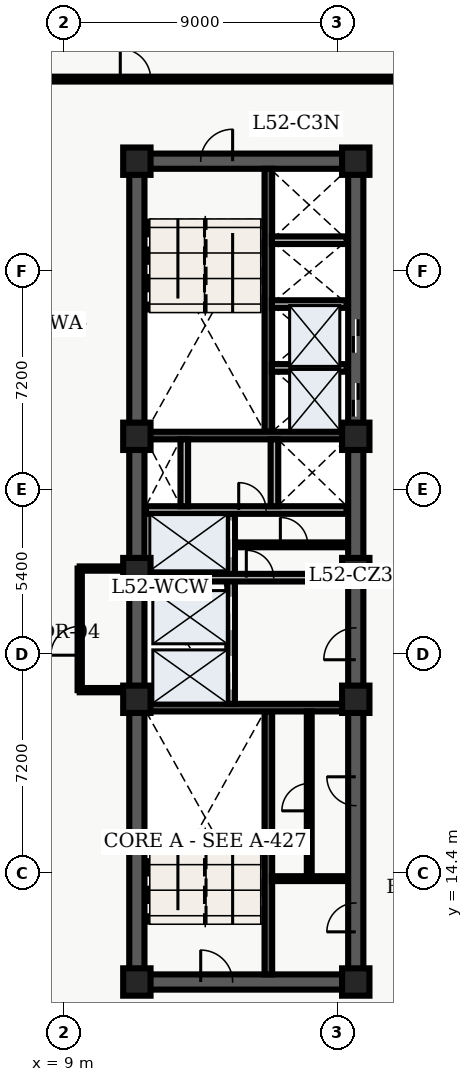
"""IFC4 building model, lengths in metres.
Left out: names, types, materials, properties, quantities, classifications, styles, units other than length and angle.
Written with IfcOpenShell. Run it as: python <this file> out.ifc"""

import sys

from ifc_helpers import new_model, entity, si_unit, converted_unit, direction, frame, origin_with_axes, origin_2d_with_axis, place, context, subcontext, project, spatial, polyline, rectangle, outline, extrude, element, fill, save


model = new_model("IFC4")
c1 = context("Model", 3, precision=1e-05, world=origin_with_axes(), true_north=direction((0.0, 1.0)))
c2 = subcontext(c1, "Body", "Model", "MODEL_VIEW")
j1 = project(units=[si_unit("LENGTHUNIT", "METRE"), converted_unit("PLANEANGLEUNIT", "DEGREE", entity("IfcPlaneAngleMeasure", 0.017), si_unit("PLANEANGLEUNIT", "RADIAN"), dimensions=[0, 0, 0, 0, 0, 0, 0])], contexts=[c1])
p1 = place(None, origin_with_axes())
s1 = spatial("IfcSite", under=j1, at=p1, CompositionType="ELEMENT")
p2 = place(p1, origin_with_axes())
s2 = spatial("IfcBuilding", under=s1, at=p2, CompositionType="ELEMENT")
p3 = place(p2, frame((0.0, 0.0, 212.1), z_axis=(0.0, 0.0, 1.0), x_axis=(1.0, 0.0, 0.0)))
s3 = spatial("IfcBuildingStorey", under=s2, at=p3, CompositionType="ELEMENT", Elevation=212.1)
p4 = place(p3, frame((11.4, 10.8, 0.0), z_axis=(0.0, 0.0, 1.0), x_axis=(0.0, 1.0, 0.0)))
e1 = element("IfcWall", 1, at=p4, inside=s3, PredefinedType="SHEAR", context=c2, shape_type="SweptSolid", body=[
    extrude(outline(polyline([(0.0, -0.25), (27.0, -0.25), (27.0, 0.25), (0.0, 0.25), (0.0, -0.25)])), origin_with_axes(), (0.0, 0.0, 1.0), 3.66),
])
p5 = place(p3, frame((11.4, 10.8, 0.0), z_axis=(0.0, 0.0, 1.0), x_axis=(1.0, 0.0, 0.0)))
e2 = element("IfcWall", 2, at=p5, inside=s3, PredefinedType="SHEAR", context=c2, shape_type="SweptSolid", body=[
    extrude(outline(polyline([(0.0, -0.25), (7.2, -0.25), (7.2, 0.25), (0.0, 0.25), (0.0, -0.25)])), origin_with_axes(), (0.0, 0.0, 1.0), 3.66),
])
p6 = place(p5, frame((2.625, 0.0, 0.0), z_axis=(0.0, 0.0, 1.0), x_axis=(1.0, 0.0, 0.0)))
e3 = element("IfcOpeningElement", 3, at=p6, cuts=e2, PredefinedType="OPENING", context=c2, shape_type="SweptSolid", body=[
    extrude(rectangle(XDim=1.05, YDim=0.52, at=origin_2d_with_axis()), origin_with_axes(), (0.0, 0.0, 1.0), 2.15),
])
p7 = place(p3, frame((11.4, 37.8, 0.0), z_axis=(0.0, 0.0, 1.0), x_axis=(1.0, 0.0, 0.0)))
e4 = element("IfcWall", 4, at=p7, inside=s3, PredefinedType="SHEAR", context=c2, shape_type="SweptSolid", body=[
    extrude(outline(polyline([(0.0, -0.25), (7.2, -0.25), (7.2, 0.25), (0.0, 0.25), (0.0, -0.25)])), origin_with_axes(), (0.0, 0.0, 1.0), 3.66),
])
p8 = place(p7, frame((2.625, 0.0, 0.0), z_axis=(0.0, 0.0, 1.0), x_axis=(1.0, 0.0, 0.0)))
e5 = element("IfcOpeningElement", 5, at=p8, cuts=e4, PredefinedType="OPENING", context=c2, shape_type="SweptSolid", body=[
    extrude(rectangle(XDim=1.05, YDim=0.52, at=origin_2d_with_axis()), origin_with_axes(), (0.0, 0.0, 1.0), 2.15),
])
p9 = place(p3, frame((18.6, 10.8, 0.0), z_axis=(0.0, 0.0, 1.0), x_axis=(0.0, 1.0, 0.0)))
e6 = element("IfcWall", 6, at=p9, inside=s3, PredefinedType="SHEAR", context=c2, shape_type="SweptSolid", body=[
    extrude(outline(polyline([(0.0, -0.25), (13.5, -0.25), (13.5, 0.25), (0.0, 0.25), (0.0, -0.25)])), origin_with_axes(), (0.0, 0.0, 1.0), 3.66),
])
p10 = place(p9, frame((11.125, 0.0, 0.0), z_axis=(0.0, 0.0, 1.0), x_axis=(1.0, 0.0, 0.0)))
e7 = element("IfcOpeningElement", 7, at=p10, cuts=e6, PredefinedType="OPENING", context=c2, shape_type="SweptSolid", body=[
    extrude(rectangle(XDim=1.05, YDim=0.52, at=origin_2d_with_axis()), origin_with_axes(), (0.0, 0.0, 1.0), 2.15),
])
p11 = place(p9, frame((2.125, 0.0, 0.0), z_axis=(0.0, 0.0, 1.0), x_axis=(1.0, 0.0, 0.0)))
e8 = element("IfcOpeningElement", 8, at=p11, cuts=e6, PredefinedType="OPENING", context=c2, shape_type="SweptSolid", body=[
    extrude(rectangle(XDim=0.95, YDim=0.52, at=origin_2d_with_axis()), origin_with_axes(), (0.0, 0.0, 1.0), 2.15),
])
p12 = place(p9, frame((6.275, 0.0, 0.0), z_axis=(0.0, 0.0, 1.0), x_axis=(1.0, 0.0, 0.0)))
e9 = element("IfcOpeningElement", 9, at=p12, cuts=e6, PredefinedType="OPENING", context=c2, shape_type="SweptSolid", body=[
    extrude(rectangle(XDim=0.95, YDim=0.52, at=origin_2d_with_axis()), origin_with_axes(), (0.0, 0.0, 1.0), 2.15),
])
p13 = place(p3, frame((18.6, 24.3, 0.0), z_axis=(0.0, 0.0, 1.0), x_axis=(0.0, 1.0, 0.0)))
e10 = element("IfcWall", 10, at=p13, inside=s3, PredefinedType="SHEAR", context=c2, shape_type="SweptSolid", body=[
    extrude(outline(polyline([(0.0, -0.25), (13.5, -0.25), (13.5, 0.25), (0.0, 0.25), (0.0, -0.25)])), origin_with_axes(), (0.0, 0.0, 1.0), 3.66),
])
p14 = place(p13, frame((5.65, 0.0, 0.0), z_axis=(0.0, 0.0, 1.0), x_axis=(1.0, 0.0, 0.0)))
e11 = element("IfcOpeningElement", 11, at=p14, cuts=e10, PredefinedType="OPENING", context=c2, shape_type="SweptSolid", body=[
    extrude(rectangle(XDim=1.1, YDim=0.52, at=origin_2d_with_axis()), origin_with_axes(), (0.0, 0.0, 1.0), 2.15),
])
p15 = place(p13, frame((7.75, 0.0, 0.0), z_axis=(0.0, 0.0, 1.0), x_axis=(1.0, 0.0, 0.0)))
e12 = element("IfcOpeningElement", 12, at=p15, cuts=e10, PredefinedType="OPENING", context=c2, shape_type="SweptSolid", body=[
    extrude(rectangle(XDim=1.1, YDim=0.52, at=origin_2d_with_axis()), origin_with_axes(), (0.0, 0.0, 1.0), 2.15),
])
p16 = place(p3, frame((15.725, 11.05, 0.0), z_axis=(0.0, 0.0, 1.0), x_axis=(0.0, 1.0, 0.0)))
e13 = element("IfcWall", 13, at=p16, inside=s3, PredefinedType="SHEAR", context=c2, shape_type="SweptSolid", body=[
    extrude(outline(polyline([(0.0, -0.125), (8.65, -0.125), (8.65, 0.125), (0.0, 0.125), (0.0, -0.125)])), origin_with_axes(), (0.0, 0.0, 1.0), 3.66),
])
p17 = place(p3, frame((11.65, 19.825, 0.0), z_axis=(0.0, 0.0, 1.0), x_axis=(1.0, 0.0, 0.0)))
e14 = element("IfcWall", 14, at=p17, inside=s3, PredefinedType="SHEAR", context=c2, shape_type="SweptSolid", body=[
    extrude(outline(polyline([(0.0, -0.125), (6.7, -0.125), (6.7, 0.125), (0.0, 0.125), (0.0, -0.125)])), origin_with_axes(), (0.0, 0.0, 1.0), 3.66),
])
p18 = place(p3, frame((15.725, 28.9, 0.0), z_axis=(0.0, 0.0, 1.0), x_axis=(0.0, 1.0, 0.0)))
e15 = element("IfcWall", 15, at=p18, inside=s3, PredefinedType="SHEAR", context=c2, shape_type="SweptSolid", body=[
    extrude(outline(polyline([(0.0, -0.125), (8.65, -0.125), (8.65, 0.125), (0.0, 0.125), (0.0, -0.125)])), origin_with_axes(), (0.0, 0.0, 1.0), 3.66),
])
p19 = place(p3, frame((11.65, 28.775, 0.0), z_axis=(0.0, 0.0, 1.0), x_axis=(1.0, 0.0, 0.0)))
e16 = element("IfcWall", 16, at=p19, inside=s3, PredefinedType="SHEAR", context=c2, shape_type="SweptSolid", body=[
    extrude(outline(polyline([(0.0, -0.125), (6.7, -0.125), (6.7, 0.125), (0.0, 0.125), (0.0, -0.125)])), origin_with_axes(), (0.0, 0.0, 1.0), 3.66),
])
p20 = place(p3, frame((14.5, 19.95, 0.0), z_axis=(0.0, 0.0, 1.0), x_axis=(0.0, 1.0, 0.0)))
e17 = element("IfcWall", 17, at=p20, inside=s3, PredefinedType="SOLIDWALL", context=c2, shape_type="SweptSolid", body=[
    extrude(outline(polyline([(0.0, -0.125), (6.25, -0.125), (6.25, 0.125), (0.0, 0.125), (0.0, -0.125)])), origin_with_axes(), (0.0, 0.0, 1.0), 2.7),
])
p21 = place(p20, frame((1.025, 0.0, 0.0), z_axis=(0.0, 0.0, 1.0), x_axis=(1.0, 0.0, 0.0)))
e18 = element("IfcOpeningElement", 18, at=p21, cuts=e17, PredefinedType="OPENING", context=c2, shape_type="SweptSolid", body=[
    extrude(rectangle(XDim=1.1, YDim=0.27, at=origin_2d_with_axis()), origin_with_axes(), (0.0, 0.0, 1.0), 2.15),
])
p22 = place(p20, frame((2.975, 0.0, 0.0), z_axis=(0.0, 0.0, 1.0), x_axis=(1.0, 0.0, 0.0)))
e19 = element("IfcOpeningElement", 19, at=p22, cuts=e17, PredefinedType="OPENING", context=c2, shape_type="SweptSolid", body=[
    extrude(rectangle(XDim=1.1, YDim=0.27, at=origin_2d_with_axis()), origin_with_axes(), (0.0, 0.0, 1.0), 2.15),
])
p23 = place(p20, frame((5.425, 0.0, 0.0), z_axis=(0.0, 0.0, 1.0), x_axis=(1.0, 0.0, 0.0)))
e20 = element("IfcOpeningElement", 20, at=p23, cuts=e17, PredefinedType="OPENING", context=c2, shape_type="SweptSolid", body=[
    extrude(rectangle(XDim=1.2, YDim=0.27, at=origin_2d_with_axis()), origin_with_axes(), (0.0, 0.0, 1.0), 2.15),
])
p24 = place(p3, frame((11.7, 24.1, 0.0), z_axis=(0.0, 0.0, 1.0), x_axis=(1.0, 0.0, 0.0)))
e21 = element("IfcWall", 21, at=p24, inside=s3, PredefinedType="SOLIDWALL", context=c2, shape_type="SweptSolid", body=[
    extrude(outline(polyline([(0.0, -0.125), (6.6, -0.125), (6.6, 0.125), (0.0, 0.125), (0.0, -0.125)])), origin_with_axes(), (0.0, 0.0, 1.0), 2.7),
])
p25 = place(p24, frame((3.75, 0.0, 0.0), z_axis=(0.0, 0.0, 1.0), x_axis=(1.0, 0.0, 0.0)))
e22 = element("IfcOpeningElement", 22, at=p25, cuts=e21, PredefinedType="OPENING", context=c2, shape_type="SweptSolid", body=[
    extrude(rectangle(XDim=0.9, YDim=0.27, at=origin_2d_with_axis()), origin_with_axes(), (0.0, 0.0, 1.0), 2.15),
])
p26 = place(p3, frame((11.7, 26.325, 0.0), z_axis=(0.0, 0.0, 1.0), x_axis=(1.0, 0.0, 0.0)))
e23 = element("IfcWall", 23, at=p26, inside=s3, PredefinedType="SOLIDWALL", context=c2, shape_type="SweptSolid", body=[
    extrude(outline(polyline([(0.0, -0.125), (6.6, -0.125), (6.6, 0.125), (0.0, 0.125), (0.0, -0.125)])), origin_with_axes(), (0.0, 0.0, 1.0), 2.7),
])
p27 = place(p26, frame((3.5, 0.0, 0.0), z_axis=(0.0, 0.0, 1.0), x_axis=(1.0, 0.0, 0.0)))
e24 = element("IfcOpeningElement", 24, at=p27, cuts=e23, PredefinedType="OPENING", context=c2, shape_type="SweptSolid", body=[
    extrude(rectangle(XDim=0.9, YDim=0.27, at=origin_2d_with_axis()), origin_with_axes(), (0.0, 0.0, 1.0), 2.15),
])
for number, where, z_axis, x_axis in (
    (25, (12.96, 26.45, 0.0), (0.0, 0.0, 1.0), (0.0, 1.0, 0.0)),
    (26, (15.925, 26.45, 0.0), (0.0, 0.0, 1.0), (0.0, 1.0, 0.0)),
):
    element("IfcWall", number, at=place(p3, frame(where, z_axis=z_axis, x_axis=x_axis)), inside=s3, PredefinedType="SOLIDWALL", context=c2, shape_type="SweptSolid", body=[
        extrude(outline(polyline([(0.0, -0.125), (2.2, -0.125), (2.2, 0.125), (0.0, 0.125), (0.0, -0.125)])), origin_with_axes(), (0.0, 0.0, 1.0), 2.7),
    ])
for number, where, z_axis, x_axis in (
    (27, (11.4, 10.8, 0.0), (0.0, 0.0, 1.0), (1.0, 0.0, 0.0)),
    (28, (11.4, 20.1, 0.0), (0.0, 0.0, 1.0), (1.0, 0.0, 0.0)),
    (29, (11.4, 24.3, 0.0), (0.0, 0.0, 1.0), (1.0, 0.0, 0.0)),
    (30, (11.4, 28.75, 0.0), (0.0, 0.0, 1.0), (1.0, 0.0, 0.0)),
    (31, (11.4, 37.8, 0.0), (0.0, 0.0, 1.0), (1.0, 0.0, 0.0)),
    (32, (18.6, 10.8, 0.0), (0.0, 0.0, 1.0), (1.0, 0.0, 0.0)),
    (33, (18.6, 20.1, 0.0), (0.0, 0.0, 1.0), (1.0, 0.0, 0.0)),
    (34, (18.6, 24.3, 0.0), (0.0, 0.0, 1.0), (1.0, 0.0, 0.0)),
    (35, (18.6, 28.75, 0.0), (0.0, 0.0, 1.0), (1.0, 0.0, 0.0)),
    (36, (18.6, 37.8, 0.0), (0.0, 0.0, 1.0), (1.0, 0.0, 0.0)),
):
    element("IfcColumn", number, at=place(p3, frame(where, z_axis=z_axis, x_axis=x_axis)), inside=s3, PredefinedType="COLUMN", context=c2, shape_type="SweptSolid", body=[
        extrude(rectangle(XDim=0.9, YDim=0.9, at=origin_2d_with_axis()), origin_with_axes(), (0.0, 0.0, 1.0), 3.9),
    ])
p28 = place(p3, frame((14.62, 25.18, 0.0), z_axis=(0.0, 0.0, 1.0), x_axis=(1.0, 0.0, 0.0)))
e37 = element("IfcWall", 37, at=p28, inside=s3, PredefinedType="PARTITIONING", context=c2, shape_type="SweptSolid", body=[
    extrude(outline(polyline([(0.0, -0.08), (3.68, -0.08), (3.68, 0.08), (0.0, 0.08), (0.0, -0.08)])), origin_with_axes(), (0.0, 0.0, 1.0), 2.7),
])
p29 = place(p28, frame((1.95, 0.0, 0.0), z_axis=(0.0, 0.0, 1.0), x_axis=(1.0, 0.0, 0.0)))
e38 = element("IfcOpeningElement", 38, at=p29, cuts=e37, PredefinedType="OPENING", context=c2, shape_type="SweptSolid", body=[
    extrude(rectangle(XDim=0.9, YDim=0.18, at=origin_2d_with_axis()), origin_with_axes(), (0.0, 0.0, 1.0), 2.15),
])
p30 = place(p3, frame((15.84, 14.2, 0.0), z_axis=(0.0, 0.0, 1.0), x_axis=(1.0, 0.0, 0.0)))
e39 = element("IfcWall", 39, at=p30, inside=s3, PredefinedType="PARTITIONING", context=c2, shape_type="SweptSolid", body=[
    extrude(outline(polyline([(0.0, -0.08), (2.46, -0.08), (2.46, 0.08), (0.0, 0.08), (0.0, -0.08)])), origin_with_axes(), (0.0, 0.0, 1.0), 2.7),
])
p31 = place(p3, frame((17.07, 14.28, 0.0), z_axis=(0.0, 0.0, 1.0), x_axis=(0.0, 1.0, 0.0)))
e40 = element("IfcWall", 40, at=p31, inside=s3, PredefinedType="PARTITIONING", context=c2, shape_type="SweptSolid", body=[
    extrude(outline(polyline([(0.0, -0.08), (5.42, -0.08), (5.42, 0.08), (0.0, 0.08), (0.0, -0.08)])), origin_with_axes(), (0.0, 0.0, 1.0), 2.7),
])
p32 = place(p31, frame((2.6, 0.0, 0.0), z_axis=(0.0, 0.0, 1.0), x_axis=(1.0, 0.0, 0.0)))
e41 = element("IfcOpeningElement", 41, at=p32, cuts=e40, PredefinedType="OPENING", context=c2, shape_type="SweptSolid", body=[
    extrude(rectangle(XDim=0.9, YDim=0.18, at=origin_2d_with_axis()), origin_with_axes(), (0.0, 0.0, 1.0), 2.15),
])
for number, where, z_axis, x_axis in (
    (42, (15.84, 31.0, 0.0), (0.0, 0.0, 1.0), (1.0, 0.0, 0.0)),
    (43, (15.84, 33.1, 0.0), (0.0, 0.0, 1.0), (1.0, 0.0, 0.0)),
    (44, (15.84, 35.2, 0.0), (0.0, 0.0, 1.0), (1.0, 0.0, 0.0)),
):
    element("IfcWall", number, at=place(p3, frame(where, z_axis=z_axis, x_axis=x_axis)), inside=s3, PredefinedType="SOLIDWALL", context=c2, shape_type="SweptSolid", body=[
        extrude(outline(polyline([(0.0, -0.125), (2.46, -0.125), (2.46, 0.125), (0.0, 0.125), (0.0, -0.125)])), origin_with_axes(), (0.0, 0.0, 1.0), 2.7),
    ])
p33 = place(p3, frame((9.52, 20.4, 0.0), z_axis=(0.0, 0.0, 1.0), x_axis=(0.0, 1.0, 0.0)))
e45 = element("IfcWall", 45, at=p33, inside=s3, PredefinedType="PARTITIONING", context=c2, shape_type="SweptSolid", body=[
    extrude(outline(polyline([(0.0, -0.07), (4.0, -0.07), (4.0, 0.07), (0.0, 0.07), (0.0, -0.07)])), origin_with_axes(), (0.0, 0.0, 1.0), 2.7),
])
p34 = place(p33, frame((1.625, 0.0, 0.0), z_axis=(0.0, 0.0, 1.0), x_axis=(1.0, 0.0, 0.0)))
e46 = element("IfcOpeningElement", 46, at=p34, cuts=e45, PredefinedType="OPENING", context=c2, shape_type="SweptSolid", body=[
    extrude(rectangle(XDim=0.95, YDim=0.16, at=origin_2d_with_axis()), origin_with_axes(), (0.0, 0.0, 1.0), 2.15),
])
for number, where, z_axis, x_axis in (
    (47, (9.52, 20.4, 0.0), (0.0, 0.0, 1.0), (1.0, 0.0, 0.0)),
    (48, (9.52, 24.4, 0.0), (0.0, 0.0, 1.0), (1.0, 0.0, 0.0)),
):
    element("IfcWall", number, at=place(p3, frame(where, z_axis=z_axis, x_axis=x_axis)), inside=s3, PredefinedType="PARTITIONING", context=c2, shape_type="SweptSolid", body=[
        extrude(outline(polyline([(0.0, -0.07), (1.58, -0.07), (1.58, 0.07), (0.0, 0.07), (0.0, -0.07)])), origin_with_axes(), (0.0, 0.0, 1.0), 2.7),
    ])
p35 = place(p3, frame((2.6, 40.5, 0.0), z_axis=(0.0, 0.0, 1.0), x_axis=(1.0, 0.0, 0.0)))
e49 = element("IfcWall", 49, at=p35, inside=s3, PredefinedType="PARTITIONING", context=c2, shape_type="SweptSolid", body=[
    extrude(outline(polyline([(0.0, -0.08), (28.59, -0.08), (28.59, 0.08), (0.0, 0.08), (0.0, -0.08)])), origin_with_axes(), (0.0, 0.0, 1.0), 2.7),
])
p36 = place(p35, frame((8.755, 0.0, 0.0), z_axis=(0.0, 0.0, 1.0), x_axis=(1.0, 0.0, 0.0)))
e50 = element("IfcOpeningElement", 50, at=p36, cuts=e49, PredefinedType="OPENING", context=c2, shape_type="SweptSolid", body=[
    extrude(rectangle(XDim=1.0, YDim=0.18, at=origin_2d_with_axis()), origin_with_axes(), (0.0, 0.0, 1.0), 2.15),
])
p37 = place(p13, frame((5.65, 0.0, 0.0), z_axis=(0.0, 0.0, 1.0), x_axis=(1.0, 0.0, 0.0)))
e51 = element("IfcDoor", 51, at=p37, inside=s3, OperationType="SLIDING_TO_LEFT", PredefinedType="DOOR", context=c2, shape_type="SweptSolid", body=[
    extrude(rectangle(XDim=1.1, YDim=0.09, at=origin_2d_with_axis()), origin_with_axes(), (0.0, 0.0, 1.0), 2.15),
])
fill(e11, e51)
p38 = place(p13, frame((7.75, 0.0, 0.0), z_axis=(0.0, 0.0, 1.0), x_axis=(1.0, 0.0, 0.0)))
e52 = element("IfcDoor", 52, at=p38, inside=s3, OperationType="SLIDING_TO_RIGHT", PredefinedType="DOOR", context=c2, shape_type="SweptSolid", body=[
    extrude(rectangle(XDim=1.1, YDim=0.09, at=origin_2d_with_axis()), origin_with_axes(), (0.0, 0.0, 1.0), 2.15),
])
fill(e12, e52)
p39 = place(p20, frame((1.025, 0.0, 0.0), z_axis=(0.0, 0.0, 1.0), x_axis=(1.0, 0.0, 0.0)))
e53 = element("IfcDoor", 53, at=p39, inside=s3, OperationType="SLIDING_TO_LEFT", PredefinedType="DOOR", context=c2, shape_type="SweptSolid", body=[
    extrude(rectangle(XDim=1.1, YDim=0.09, at=origin_2d_with_axis()), origin_with_axes(), (0.0, 0.0, 1.0), 2.15),
])
fill(e18, e53)
p40 = place(p20, frame((2.975, 0.0, 0.0), z_axis=(0.0, 0.0, 1.0), x_axis=(1.0, 0.0, 0.0)))
e54 = element("IfcDoor", 54, at=p40, inside=s3, OperationType="SLIDING_TO_RIGHT", PredefinedType="DOOR", context=c2, shape_type="SweptSolid", body=[
    extrude(rectangle(XDim=1.1, YDim=0.09, at=origin_2d_with_axis()), origin_with_axes(), (0.0, 0.0, 1.0), 2.15),
])
fill(e19, e54)
p41 = place(p20, frame((5.425, 0.0, 0.0), z_axis=(0.0, 0.0, 1.0), x_axis=(1.0, 0.0, 0.0)))
e55 = element("IfcDoor", 55, at=p41, inside=s3, OperationType="DOUBLE_DOOR_SLIDING", PredefinedType="DOOR", context=c2, shape_type="SweptSolid", body=[
    extrude(rectangle(XDim=1.2, YDim=0.09, at=origin_2d_with_axis()), origin_with_axes(), (0.0, 0.0, 1.0), 2.15),
])
fill(e20, e55)
p42 = place(p5, frame((2.625, 0.0, 0.0), z_axis=(0.0, 0.0, 1.0), x_axis=(1.0, 0.0, 0.0)))
e56 = element("IfcDoor", 56, at=p42, inside=s3, OperationType="SINGLE_SWING_LEFT", PredefinedType="DOOR", context=c2, shape_type="SweptSolid", body=[
    extrude(rectangle(XDim=1.05, YDim=0.09, at=origin_2d_with_axis()), origin_with_axes(), (0.0, 0.0, 1.0), 2.15),
])
fill(e3, e56)
p43 = place(p7, frame((2.625, 0.0, 0.0), z_axis=(0.0, 0.0, 1.0), x_axis=(1.0, 0.0, 0.0)))
e57 = element("IfcDoor", 57, at=p43, inside=s3, OperationType="SINGLE_SWING_RIGHT", PredefinedType="DOOR", context=c2, shape_type="SweptSolid", body=[
    extrude(rectangle(XDim=1.05, YDim=0.09, at=origin_2d_with_axis()), origin_with_axes(), (0.0, 0.0, 1.0), 2.15),
])
fill(e5, e57)
p44 = place(p9, frame((11.125, 0.0, 0.0), z_axis=(0.0, 0.0, 1.0), x_axis=(1.0, 0.0, 0.0)))
e58 = element("IfcDoor", 58, at=p44, inside=s3, OperationType="SINGLE_SWING_LEFT", PredefinedType="DOOR", context=c2, shape_type="SweptSolid", body=[
    extrude(rectangle(XDim=1.05, YDim=0.09, at=origin_2d_with_axis()), origin_with_axes(), (0.0, 0.0, 1.0), 2.15),
])
fill(e7, e58)
p45 = place(p26, frame((3.5, 0.0, 0.0), z_axis=(0.0, 0.0, 1.0), x_axis=(1.0, 0.0, 0.0)))
e59 = element("IfcDoor", 59, at=p45, inside=s3, OperationType="SINGLE_SWING_LEFT", PredefinedType="DOOR", context=c2, shape_type="SweptSolid", body=[
    extrude(rectangle(XDim=0.9, YDim=0.09, at=origin_2d_with_axis()), origin_with_axes(), (0.0, 0.0, 1.0), 2.15),
])
fill(e24, e59)
p46 = place(p24, frame((3.75, 0.0, 0.0), z_axis=(0.0, 0.0, 1.0), x_axis=(1.0, 0.0, 0.0)))
e60 = element("IfcDoor", 60, at=p46, inside=s3, OperationType="SINGLE_SWING_LEFT", PredefinedType="DOOR", context=c2, shape_type="SweptSolid", body=[
    extrude(rectangle(XDim=0.9, YDim=0.09, at=origin_2d_with_axis()), origin_with_axes(), (0.0, 0.0, 1.0), 2.15),
])
fill(e22, e60)
p47 = place(p28, frame((1.95, 0.0, 0.0), z_axis=(0.0, 0.0, 1.0), x_axis=(1.0, 0.0, 0.0)))
e61 = element("IfcDoor", 61, at=p47, inside=s3, OperationType="SINGLE_SWING_LEFT", PredefinedType="DOOR", context=c2, shape_type="SweptSolid", body=[
    extrude(rectangle(XDim=0.9, YDim=0.09, at=origin_2d_with_axis()), origin_with_axes(), (0.0, 0.0, 1.0), 2.15),
])
fill(e38, e61)
p48 = place(p9, frame((2.125, 0.0, 0.0), z_axis=(0.0, 0.0, 1.0), x_axis=(1.0, 0.0, 0.0)))
e62 = element("IfcDoor", 62, at=p48, inside=s3, OperationType="SINGLE_SWING_LEFT", PredefinedType="DOOR", context=c2, shape_type="SweptSolid", body=[
    extrude(rectangle(XDim=0.95, YDim=0.09, at=origin_2d_with_axis()), origin_with_axes(), (0.0, 0.0, 1.0), 2.15),
])
fill(e8, e62)
p49 = place(p31, frame((2.6, 0.0, 0.0), z_axis=(0.0, 0.0, 1.0), x_axis=(1.0, 0.0, 0.0)))
e63 = element("IfcDoor", 63, at=p49, inside=s3, OperationType="SINGLE_SWING_LEFT", PredefinedType="DOOR", context=c2, shape_type="SweptSolid", body=[
    extrude(rectangle(XDim=0.9, YDim=0.09, at=origin_2d_with_axis()), origin_with_axes(), (0.0, 0.0, 1.0), 2.15),
])
fill(e41, e63)
p50 = place(p9, frame((6.275, 0.0, 0.0), z_axis=(0.0, 0.0, 1.0), x_axis=(1.0, 0.0, 0.0)))
e64 = element("IfcDoor", 64, at=p50, inside=s3, OperationType="SINGLE_SWING_RIGHT", PredefinedType="DOOR", context=c2, shape_type="SweptSolid", body=[
    extrude(rectangle(XDim=0.95, YDim=0.09, at=origin_2d_with_axis()), origin_with_axes(), (0.0, 0.0, 1.0), 2.15),
])
fill(e9, e64)
p51 = place(p33, frame((1.625, 0.0, 0.0), z_axis=(0.0, 0.0, 1.0), x_axis=(1.0, 0.0, 0.0)))
e65 = element("IfcDoor", 65, at=p51, inside=s3, OperationType="SINGLE_SWING_LEFT", PredefinedType="DOOR", context=c2, shape_type="SweptSolid", body=[
    extrude(rectangle(XDim=0.95, YDim=0.084, at=origin_2d_with_axis()), origin_with_axes(), (0.0, 0.0, 1.0), 2.15),
])
fill(e46, e65)
p52 = place(p35, frame((8.755, 0.0, 0.0), z_axis=(0.0, 0.0, 1.0), x_axis=(1.0, 0.0, 0.0)))
e66 = element("IfcDoor", 66, at=p52, inside=s3, OperationType="SINGLE_SWING_LEFT", PredefinedType="DOOR", context=c2, shape_type="SweptSolid", body=[
    extrude(rectangle(XDim=1.0, YDim=0.09, at=origin_2d_with_axis()), origin_with_axes(), (0.0, 0.0, 1.0), 2.15),
])
fill(e50, e66)
save(model, sys.argv[1])
